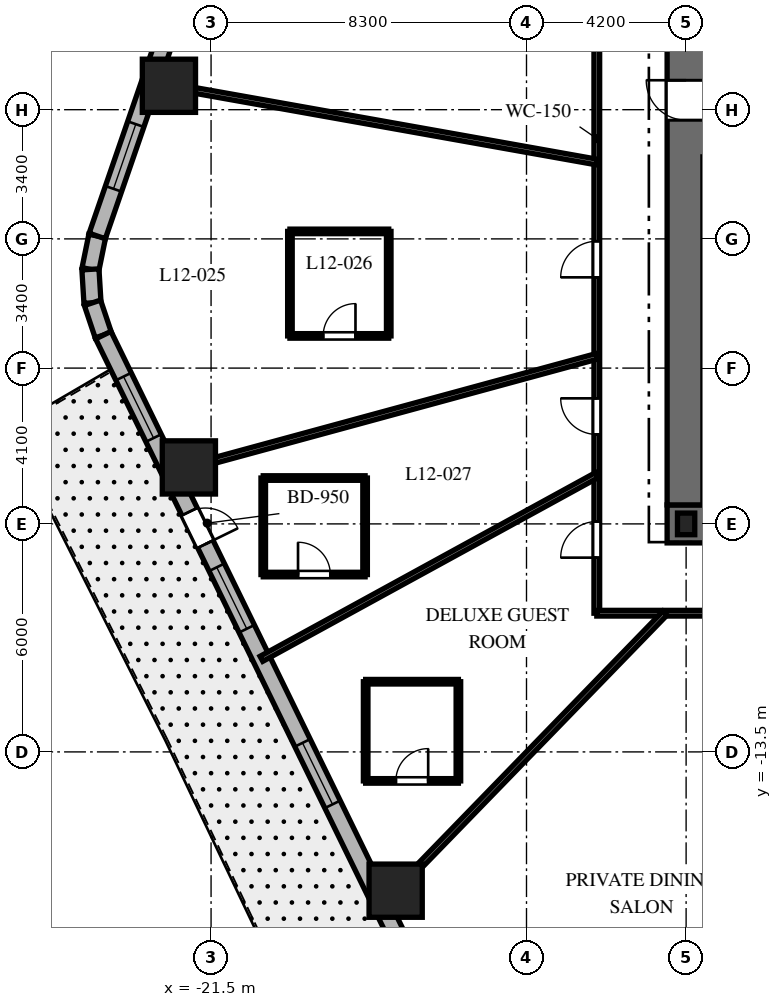
"""IFC4 building model, lengths in metres.
Left out: names, types, materials, properties, quantities, classifications, styles, units other than length and angle.
Written with IfcOpenShell. Run it as: python <this file> out.ifc"""

import sys

from ifc_helpers import new_model, si_unit, direction, frame, frame_2d, origin, origin_2d, place, context, subcontext, project, spatial, rectangle, i_section, extrude, element, fill, save


model = new_model("IFC4")
c1 = context("Model", 3, precision=1e-05, world=origin(), true_north=direction((0.0, 1.0)))
c2 = subcontext(c1, "Body", "Model", "MODEL_VIEW")
j1 = project(units=[si_unit("LENGTHUNIT", "METRE"), si_unit("PLANEANGLEUNIT", "RADIAN")], contexts=[c1])
p1 = place(None, origin())
s1 = spatial("IfcSite", under=j1, at=p1, CompositionType="ELEMENT")
p2 = place(p1, origin())
s2 = spatial("IfcBuilding", under=s1, at=p2, CompositionType="ELEMENT")
p3 = place(p2, frame((0.0, 0.0, 56.4)))
s3 = spatial("IfcBuildingStorey", under=s2, at=p3, CompositionType="ELEMENT", Elevation=56.4)
p4 = place(p3, frame((-9.5, -7.5, 0.0), z_axis=(0.0, 0.0, 1.0), x_axis=(1.0, 0.0, 0.0)))
e1 = element("IfcWall", 1, at=p4, inside=s3, PredefinedType="SHEAR", context=c2, shape_type="SweptSolid", body=[
    extrude(rectangle(XDim=19.0, YDim=1.0, at=frame_2d((9.5, 0.0))), origin(), (0.0, 0.0, 1.0), 3.7),
])
p5 = place(p4, frame((9.55, 0.0, 0.0)))
e2 = element("IfcOpeningElement", 2, at=p5, cuts=e1, PredefinedType="OPENING", context=c2, shape_type="SweptSolid", body=[
    extrude(rectangle(XDim=1.0, YDim=2.15, at=frame_2d((0.5, 1.075))), frame((0.0, 0.51, 0.0), z_axis=(0.0, -1.0, 0.0), x_axis=(1.0, 0.0, 0.0)), (0.0, 0.0, 1.0), 1.02),
])
p6 = place(p3, frame((-9.0, -7.0, 0.0), z_axis=(0.0, 0.0, 1.0), x_axis=(0.0, 1.0, 0.0)))
e3 = element("IfcWall", 3, at=p6, inside=s3, PredefinedType="SHEAR", context=c2, shape_type="SweptSolid", body=[
    extrude(rectangle(XDim=14.0, YDim=1.0, at=frame_2d((7.0, 0.0))), origin(), (0.0, 0.0, 1.0), 3.7),
])
p7 = place(p6, frame((10.125, 0.0, 0.0)))
e4 = element("IfcOpeningElement", 4, at=p7, cuts=e3, PredefinedType="OPENING", context=c2, shape_type="SweptSolid", body=[
    extrude(rectangle(XDim=1.05, YDim=2.15, at=frame_2d((0.525, 1.075))), frame((0.0, 0.51, 0.0), z_axis=(0.0, -1.0, 0.0), x_axis=(1.0, 0.0, 0.0)), (0.0, 0.0, 1.0), 1.02),
])
p8 = place(p3, frame((-8.458, -6.985, 0.0), z_axis=(0.0, 0.0, 1.0), x_axis=(0.0, 1.0, 0.0)))
e5 = element("IfcWall", 5, at=p8, inside=s3, PredefinedType="SHEAR", context=c2, shape_type="SweptSolid", body=[
    extrude(rectangle(XDim=9.143, YDim=0.2, at=frame_2d((4.572, 0.0))), origin(), (0.0, 0.0, 1.0), 3.7),
])
p9 = place(p3, frame((-9.0, -7.5, 0.0), z_axis=(0.0, 0.0, 1.0), x_axis=(1.0, 0.0, 0.0)))
e6 = element("IfcColumn", 6, at=p9, inside=s3, PredefinedType="COLUMN", context=c2, shape_type="SweptSolid", body=[
    extrude(i_section(OverallWidth=0.454, OverallDepth=0.569, WebThickness=0.078, FlangeThickness=0.125, at=origin_2d()), origin(), (0.0, 0.0, 1.0), 3.7),
])
for number, where, z_axis, x_axis in (
    (7, (-22.609, 4.029, 0.0), (0.0, 0.0, 1.0), (1.0, 0.0, 0.0)),
    (8, (-22.084, -6.014, 0.0), (0.0, 0.0, 1.0), (1.0, 0.0, 0.0)),
    (9, (-16.643, -17.152, 0.0), (0.0, 0.0, 1.0), (1.0, 0.0, 0.0)),
):
    element("IfcColumn", number, at=place(p3, frame(where, z_axis=z_axis, x_axis=x_axis)), inside=s3, PredefinedType="COLUMN", context=c2, shape_type="SweptSolid", body=[
        extrude(rectangle(XDim=1.4, YDim=1.4, at=origin_2d()), origin(), (0.0, 0.0, 1.0), 3.7),
    ])
p10 = place(p3, frame((-24.496, 0.077, 0.0), z_axis=(0.0, 0.0, 1.0), x_axis=(-0.199570594521, -0.979883451132, 0.0)))
e10 = element("IfcWall", 10, at=p10, inside=s3, PredefinedType="SOLIDWALL", context=c2, shape_type="SweptSolid", body=[
    extrude(rectangle(XDim=0.897, YDim=0.45, at=frame_2d((0.448, 0.0))), origin(), (0.0, 0.0, 1.0), 3.4),
])
p11 = place(p3, frame((-24.675, -0.802, 0.0), z_axis=(0.0, 0.0, 1.0), x_axis=(0.061188874166, -0.998126205286, 0.0)))
e11 = element("IfcWall", 11, at=p11, inside=s3, PredefinedType="SOLIDWALL", context=c2, shape_type="SweptSolid", body=[
    extrude(rectangle(XDim=0.882, YDim=0.45, at=frame_2d((0.441, 0.0))), origin(), (0.0, 0.0, 1.0), 3.4),
])
p12 = place(p3, frame((-24.621, -1.682, 0.0), z_axis=(0.0, 0.0, 1.0), x_axis=(0.317697451681, -0.948192137278, 0.0)))
e12 = element("IfcWall", 12, at=p12, inside=s3, PredefinedType="SOLIDWALL", context=c2, shape_type="SweptSolid", body=[
    extrude(rectangle(XDim=0.897, YDim=0.45, at=frame_2d((0.448, 0.0))), origin(), (0.0, 0.0, 1.0), 3.4),
])
p13 = place(p3, frame((-17.39, 20.678, 0.0), z_axis=(0.0, 0.0, 1.0), x_axis=(-0.326068018294, -0.945346310854, 0.0)))
e13 = element("IfcWall", 13, at=p13, inside=s3, PredefinedType="SOLIDWALL", context=c2, shape_type="SweptSolid", body=[
    extrude(rectangle(XDim=21.793, YDim=0.45, at=frame_2d((10.896, 0.0))), origin(), (0.0, 0.0, 1.0), 3.4),
])
p14 = place(p13, frame((1.26, 0.0, 0.8)))
e14 = element("IfcOpeningElement", 14, at=p14, cuts=e13, PredefinedType="OPENING", context=c2, shape_type="SweptSolid", body=[
    extrude(rectangle(XDim=1.8, YDim=1.8, at=frame_2d((0.9, 0.9))), frame((0.0, 0.235, 0.0), z_axis=(0.0, -1.0, 0.0), x_axis=(1.0, 0.0, 0.0)), (0.0, 0.0, 1.0), 0.47),
])
p15 = place(p13, frame((9.943, 0.0, 0.8)))
e15 = element("IfcOpeningElement", 15, at=p15, cuts=e13, PredefinedType="OPENING", context=c2, shape_type="SweptSolid", body=[
    extrude(rectangle(XDim=1.8, YDim=1.8, at=frame_2d((0.9, 0.9))), frame((0.0, 0.235, 0.0), z_axis=(0.0, -1.0, 0.0), x_axis=(1.0, 0.0, 0.0)), (0.0, 0.0, 1.0), 0.47),
])
p16 = place(p13, frame((18.68, 0.0, 0.8)))
e16 = element("IfcOpeningElement", 16, at=p16, cuts=e13, PredefinedType="OPENING", context=c2, shape_type="SweptSolid", body=[
    extrude(rectangle(XDim=1.8, YDim=1.8, at=frame_2d((0.9, 0.9))), frame((0.0, 0.235, 0.0), z_axis=(0.0, -1.0, 0.0), x_axis=(1.0, 0.0, 0.0)), (0.0, 0.0, 1.0), 0.47),
])
p17 = place(p3, frame((-24.336, -2.532, 0.0), z_axis=(0.0, 0.0, 1.0), x_axis=(0.438931326393, -0.898520612291, 0.0)))
e17 = element("IfcWall", 17, at=p17, inside=s3, PredefinedType="SOLIDWALL", context=c2, shape_type="SweptSolid", body=[
    extrude(rectangle(XDim=20.623, YDim=0.45, at=frame_2d((10.312, 0.0))), origin(), (0.0, 0.0, 1.0), 3.4),
])
p18 = place(p17, frame((5.171, 0.0, 0.0)))
e18 = element("IfcOpeningElement", 18, at=p18, cuts=e17, PredefinedType="OPENING", context=c2, shape_type="SweptSolid", body=[
    extrude(rectangle(XDim=0.95, YDim=2.15, at=frame_2d((0.475, 1.075))), frame((0.0, 0.235, 0.0), z_axis=(0.0, -1.0, 0.0), x_axis=(1.0, 0.0, 0.0)), (0.0, 0.0, 1.0), 0.47),
])
p19 = place(p17, frame((1.214, 0.0, 0.8)))
e19 = element("IfcOpeningElement", 19, at=p19, cuts=e17, PredefinedType="OPENING", context=c2, shape_type="SweptSolid", body=[
    extrude(rectangle(XDim=1.8, YDim=1.8, at=frame_2d((0.9, 0.9))), frame((0.0, 0.235, 0.0), z_axis=(0.0, -1.0, 0.0), x_axis=(1.0, 0.0, 0.0)), (0.0, 0.0, 1.0), 0.47),
])
p20 = place(p17, frame((6.8, 0.0, 0.8)))
e20 = element("IfcOpeningElement", 20, at=p20, cuts=e17, PredefinedType="OPENING", context=c2, shape_type="SweptSolid", body=[
    extrude(rectangle(XDim=1.8, YDim=1.8, at=frame_2d((0.9, 0.9))), frame((0.0, 0.235, 0.0), z_axis=(0.0, -1.0, 0.0), x_axis=(1.0, 0.0, 0.0)), (0.0, 0.0, 1.0), 0.47),
])
p21 = place(p17, frame((11.942, 0.0, 0.8)))
e21 = element("IfcOpeningElement", 21, at=p21, cuts=e17, PredefinedType="OPENING", context=c2, shape_type="SweptSolid", body=[
    extrude(rectangle(XDim=1.8, YDim=1.8, at=frame_2d((0.9, 0.9))), frame((0.0, 0.235, 0.0), z_axis=(0.0, -1.0, 0.0), x_axis=(1.0, 0.0, 0.0)), (0.0, 0.0, 1.0), 0.47),
])
p22 = place(p17, frame((17.66, 0.0, 0.8)))
e22 = element("IfcOpeningElement", 22, at=p22, cuts=e17, PredefinedType="OPENING", context=c2, shape_type="SweptSolid", body=[
    extrude(rectangle(XDim=1.8, YDim=1.8, at=frame_2d((0.9, 0.9))), frame((0.0, 0.235, 0.0), z_axis=(0.0, -1.0, 0.0), x_axis=(1.0, 0.0, 0.0)), (0.0, 0.0, 1.0), 0.47),
])
p23 = place(p3, frame((-11.35, -9.85, 0.0), z_axis=(0.0, 0.0, 1.0), x_axis=(0.0, 1.0, 0.0)))
e23 = element("IfcWall", 23, at=p23, inside=s3, PredefinedType="PARTITIONING", context=c2, shape_type="SweptSolid", body=[
    extrude(rectangle(XDim=19.7, YDim=0.15, at=frame_2d((9.85, 0.0))), origin(), (0.0, 0.0, 1.0), 2.84),
])
p24 = place(p23, frame((15.191, 0.0, 0.0)))
e24 = element("IfcOpeningElement", 24, at=p24, cuts=e23, PredefinedType="OPENING", context=c2, shape_type="SweptSolid", body=[
    extrude(rectangle(XDim=0.95, YDim=2.03, at=frame_2d((0.475, 1.015))), frame((0.0, 0.085, 0.0), z_axis=(0.0, -1.0, 0.0), x_axis=(1.0, 0.0, 0.0)), (0.0, 0.0, 1.0), 0.17),
])
p25 = place(p23, frame((8.838, 0.0, 0.0)))
e25 = element("IfcOpeningElement", 25, at=p25, cuts=e23, PredefinedType="OPENING", context=c2, shape_type="SweptSolid", body=[
    extrude(rectangle(XDim=0.95, YDim=2.03, at=frame_2d((0.475, 1.015))), frame((0.0, 0.085, 0.0), z_axis=(0.0, -1.0, 0.0), x_axis=(1.0, 0.0, 0.0)), (0.0, 0.0, 1.0), 0.17),
])
p26 = place(p23, frame((4.704, 0.0, 0.0)))
e26 = element("IfcOpeningElement", 26, at=p26, cuts=e23, PredefinedType="OPENING", context=c2, shape_type="SweptSolid", body=[
    extrude(rectangle(XDim=0.95, YDim=2.03, at=frame_2d((0.475, 1.015))), frame((0.0, 0.085, 0.0), z_axis=(0.0, -1.0, 0.0), x_axis=(1.0, 0.0, 0.0)), (0.0, 0.0, 1.0), 0.17),
])
p27 = place(p23, frame((1.462, 0.0, 0.0)))
e27 = element("IfcOpeningElement", 27, at=p27, cuts=e23, PredefinedType="OPENING", context=c2, shape_type="SweptSolid", body=[
    extrude(rectangle(XDim=0.95, YDim=2.03, at=frame_2d((0.475, 1.015))), frame((0.0, 0.085, 0.0), z_axis=(0.0, -1.0, 0.0), x_axis=(1.0, 0.0, 0.0)), (0.0, 0.0, 1.0), 0.17),
])
p28 = place(p3, frame((11.35, -9.85, 0.0), z_axis=(0.0, 0.0, 1.0), x_axis=(-1.0, 0.0, 0.0)))
e28 = element("IfcWall", 28, at=p28, inside=s3, PredefinedType="PARTITIONING", context=c2, shape_type="SweptSolid", body=[
    extrude(rectangle(XDim=22.7, YDim=0.15, at=frame_2d((11.35, 0.0))), origin(), (0.0, 0.0, 1.0), 2.84),
])
p29 = place(p28, frame((17.225, 0.0, 0.0)))
e29 = element("IfcOpeningElement", 29, at=p29, cuts=e28, PredefinedType="OPENING", context=c2, shape_type="SweptSolid", body=[
    extrude(rectangle(XDim=0.95, YDim=2.03, at=frame_2d((0.475, 1.015))), frame((0.0, 0.085, 0.0), z_axis=(0.0, -1.0, 0.0), x_axis=(1.0, 0.0, 0.0)), (0.0, 0.0, 1.0), 0.17),
])
p30 = place(p28, frame((10.444, 0.0, 0.0)))
e30 = element("IfcOpeningElement", 30, at=p30, cuts=e28, PredefinedType="OPENING", context=c2, shape_type="SweptSolid", body=[
    extrude(rectangle(XDim=0.95, YDim=2.03, at=frame_2d((0.475, 1.015))), frame((0.0, 0.085, 0.0), z_axis=(0.0, -1.0, 0.0), x_axis=(1.0, 0.0, 0.0)), (0.0, 0.0, 1.0), 0.17),
])
p31 = place(p28, frame((3.369, 0.0, 0.0)))
e31 = element("IfcOpeningElement", 31, at=p31, cuts=e28, PredefinedType="OPENING", context=c2, shape_type="SweptSolid", body=[
    extrude(rectangle(XDim=0.95, YDim=2.03, at=frame_2d((0.475, 1.015))), frame((0.0, 0.085, 0.0), z_axis=(0.0, -1.0, 0.0), x_axis=(1.0, 0.0, 0.0)), (0.0, 0.0, 1.0), 0.17),
])
p32 = place(p3, frame((-11.35, 2.023, 0.0), z_axis=(0.0, 0.0, 1.0), x_axis=(-0.984493741877, 0.17541970301, 0.0)))
e32 = element("IfcWall", 32, at=p32, inside=s3, PredefinedType="PARTITIONING", context=c2, shape_type="SweptSolid", body=[
    extrude(rectangle(XDim=11.937, YDim=0.15, at=frame_2d((5.969, 0.0))), origin(), (0.0, 0.0, 1.0), 2.54),
])
p33 = place(p3, frame((-11.35, -3.091, 0.0), z_axis=(0.0, 0.0, 1.0), x_axis=(-0.964859685283, -0.262765651704, 0.0)))
e33 = element("IfcWall", 33, at=p33, inside=s3, PredefinedType="PARTITIONING", context=c2, shape_type="SweptSolid", body=[
    extrude(rectangle(XDim=11.629, YDim=0.15, at=frame_2d((5.814, 0.0))), origin(), (0.0, 0.0, 1.0), 2.54),
])
p34 = place(p3, frame((-11.35, -6.217, 0.0), z_axis=(0.0, 0.0, 1.0), x_axis=(-0.877047587135, -0.480403507378, 0.0)))
e34 = element("IfcWall", 34, at=p34, inside=s3, PredefinedType="PARTITIONING", context=c2, shape_type="SweptSolid", body=[
    extrude(rectangle(XDim=10.062, YDim=0.15, at=frame_2d((5.031, 0.0))), origin(), (0.0, 0.0, 1.0), 2.54),
])
p35 = place(p3, frame((-9.558, -9.85, 0.0), z_axis=(0.0, 0.0, 1.0), x_axis=(-0.69638346089, -0.717669893056, 0.0)))
e35 = element("IfcWall", 35, at=p35, inside=s3, PredefinedType="PARTITIONING", context=c2, shape_type="SweptSolid", body=[
    extrude(rectangle(XDim=10.701, YDim=0.15, at=frame_2d((5.351, 0.0))), origin(), (0.0, 0.0, 1.0), 2.54),
])
p36 = place(p3, frame((-19.425, -2.553, 0.0), z_axis=(0.0, 0.0, 1.0), x_axis=(1.0, 0.0, 0.0)))
e36 = element("IfcWall", 36, at=p36, inside=s3, PredefinedType="PARTITIONING", context=c2, shape_type="SweptSolid", body=[
    extrude(rectangle(XDim=2.6, YDim=0.12, at=frame_2d((1.3, 0.0))), origin(), (0.0, 0.0, 1.0), 2.841),
])
p37 = place(p36, frame((0.875, 0.0, 0.0)))
e37 = element("IfcOpeningElement", 37, at=p37, cuts=e36, PredefinedType="OPENING", context=c2, shape_type="SweptSolid", body=[
    extrude(rectangle(XDim=0.85, YDim=2.03, at=frame_2d((0.425, 1.015))), frame((0.0, 0.07, 0.0), z_axis=(0.0, -1.0, 0.0), x_axis=(1.0, 0.0, 0.0)), (0.0, 0.0, 1.0), 0.14),
])
p38 = place(p3, frame((-16.825, -2.553, 0.0), z_axis=(0.0, 0.0, 1.0), x_axis=(0.0, 1.0, 0.0)))
e38 = element("IfcWall", 38, at=p38, inside=s3, PredefinedType="PARTITIONING", context=c2, shape_type="SweptSolid", body=[
    extrude(rectangle(XDim=2.75, YDim=0.12, at=frame_2d((1.375, 0.0))), origin(), (0.0, 0.0, 1.0), 3.4),
])
p39 = place(p3, frame((-16.825, 0.197, 0.0), z_axis=(0.0, 0.0, 1.0), x_axis=(-1.0, 0.0, 0.0)))
e39 = element("IfcWall", 39, at=p39, inside=s3, PredefinedType="PARTITIONING", context=c2, shape_type="SweptSolid", body=[
    extrude(rectangle(XDim=2.6, YDim=0.12, at=frame_2d((1.3, 0.0))), origin(), (0.0, 0.0, 1.0), 2.841),
])
p40 = place(p3, frame((-19.425, 0.197, 0.0), z_axis=(0.0, 0.0, 1.0), x_axis=(0.0, -1.0, 0.0)))
e40 = element("IfcWall", 40, at=p40, inside=s3, PredefinedType="PARTITIONING", context=c2, shape_type="SweptSolid", body=[
    extrude(rectangle(XDim=2.75, YDim=0.12, at=frame_2d((1.375, 0.0))), origin(), (0.0, 0.0, 1.0), 3.4),
])
p41 = place(p3, frame((-20.127, -8.833, 0.0), z_axis=(0.0, 0.0, 1.0), x_axis=(1.0, 0.0, 0.0)))
e41 = element("IfcWall", 41, at=p41, inside=s3, PredefinedType="PARTITIONING", context=c2, shape_type="SweptSolid", body=[
    extrude(rectangle(XDim=2.68, YDim=0.12, at=frame_2d((1.34, 0.0))), origin(), (0.0, 0.0, 1.0), 3.4),
])
p42 = place(p41, frame((0.915, 0.0, 0.0)))
e42 = element("IfcOpeningElement", 42, at=p42, cuts=e41, PredefinedType="OPENING", context=c2, shape_type="SweptSolid", body=[
    extrude(rectangle(XDim=0.85, YDim=2.03, at=frame_2d((0.425, 1.015))), frame((0.0, 0.07, 0.0), z_axis=(0.0, -1.0, 0.0), x_axis=(1.0, 0.0, 0.0)), (0.0, 0.0, 1.0), 0.14),
])
p43 = place(p3, frame((-17.447, -8.833, 0.0), z_axis=(0.0, 0.0, 1.0), x_axis=(0.0, 1.0, 0.0)))
e43 = element("IfcWall", 43, at=p43, inside=s3, PredefinedType="PARTITIONING", context=c2, shape_type="SweptSolid", body=[
    extrude(rectangle(XDim=2.54, YDim=0.12, at=frame_2d((1.27, 0.0))), origin(), (0.0, 0.0, 1.0), 2.84),
])
p44 = place(p3, frame((-17.447, -6.293, 0.0), z_axis=(0.0, 0.0, 1.0), x_axis=(-1.0, 0.0, 0.0)))
e44 = element("IfcWall", 44, at=p44, inside=s3, PredefinedType="PARTITIONING", context=c2, shape_type="SweptSolid", body=[
    extrude(rectangle(XDim=2.68, YDim=0.12, at=frame_2d((1.34, 0.0))), origin(), (0.0, 0.0, 1.0), 2.84),
])
p45 = place(p3, frame((-20.127, -6.293, 0.0), z_axis=(0.0, 0.0, 1.0), x_axis=(0.0, -1.0, 0.0)))
e45 = element("IfcWall", 45, at=p45, inside=s3, PredefinedType="PARTITIONING", context=c2, shape_type="SweptSolid", body=[
    extrude(rectangle(XDim=2.54, YDim=0.12, at=frame_2d((1.27, 0.0))), origin(), (0.0, 0.0, 1.0), 2.84),
])
p46 = place(p3, frame((-17.432, -14.263, 0.0), z_axis=(0.0, 0.0, 1.0), x_axis=(1.0, 0.0, 0.0)))
e46 = element("IfcWall", 46, at=p46, inside=s3, PredefinedType="PARTITIONING", context=c2, shape_type="SweptSolid", body=[
    extrude(rectangle(XDim=2.44, YDim=0.12, at=frame_2d((1.22, 0.0))), origin(), (0.0, 0.0, 1.0), 3.4),
])
p47 = place(p46, frame((0.795, 0.0, 0.0)))
e47 = element("IfcOpeningElement", 47, at=p47, cuts=e46, PredefinedType="OPENING", context=c2, shape_type="SweptSolid", body=[
    extrude(rectangle(XDim=0.85, YDim=2.03, at=frame_2d((0.425, 1.015))), frame((0.0, 0.07, 0.0), z_axis=(0.0, -1.0, 0.0), x_axis=(1.0, 0.0, 0.0)), (0.0, 0.0, 1.0), 0.14),
])
p48 = place(p3, frame((-14.992, -14.263, 0.0), z_axis=(0.0, 0.0, 1.0), x_axis=(0.0, 1.0, 0.0)))
e48 = element("IfcWall", 48, at=p48, inside=s3, PredefinedType="PARTITIONING", context=c2, shape_type="SweptSolid", body=[
    extrude(rectangle(XDim=2.61, YDim=0.12, at=frame_2d((1.305, 0.0))), origin(), (0.0, 0.0, 1.0), 2.927),
])
p49 = place(p3, frame((-14.992, -11.653, 0.0), z_axis=(0.0, 0.0, 1.0), x_axis=(-1.0, 0.0, 0.0)))
e49 = element("IfcWall", 49, at=p49, inside=s3, PredefinedType="PARTITIONING", context=c2, shape_type="SweptSolid", body=[
    extrude(rectangle(XDim=2.44, YDim=0.12, at=frame_2d((1.22, 0.0))), origin(), (0.0, 0.0, 1.0), 2.927),
])
p50 = place(p3, frame((-17.432, -11.653, 0.0), z_axis=(0.0, 0.0, 1.0), x_axis=(0.0, -1.0, 0.0)))
e50 = element("IfcWall", 50, at=p50, inside=s3, PredefinedType="PARTITIONING", context=c2, shape_type="SweptSolid", body=[
    extrude(rectangle(XDim=2.61, YDim=0.12, at=frame_2d((1.305, 0.0))), origin(), (0.0, 0.0, 1.0), 3.4),
])
p51 = place(p16, origin())
e51 = element("IfcWindow", 51, at=p51, inside=s3, PartitioningType="SINGLE_PANEL", PredefinedType="WINDOW", context=c2, shape_type="SweptSolid", body=[
    extrude(rectangle(XDim=1.8, YDim=1.8, at=frame_2d((0.9, 0.9))), frame((0.0, 0.03, 0.0), z_axis=(0.0, -1.0, 0.0), x_axis=(1.0, 0.0, 0.0)), (0.0, 0.0, 1.0), 0.06),
])
fill(e16, e51)
p52 = place(p18, origin())
e52 = element("IfcDoor", 52, at=p52, inside=s3, OperationType="SINGLE_SWING_RIGHT", PredefinedType="DOOR", context=c2, shape_type="SweptSolid", body=[
    extrude(rectangle(XDim=0.95, YDim=2.15, at=frame_2d((0.475, 1.075))), frame((0.0, 0.025, 0.0), z_axis=(0.0, -1.0, 0.0), x_axis=(1.0, 0.0, 0.0)), (0.0, 0.0, 1.0), 0.05),
])
fill(e18, e52)
p53 = place(p19, origin())
e53 = element("IfcWindow", 53, at=p53, inside=s3, PartitioningType="SINGLE_PANEL", PredefinedType="WINDOW", context=c2, shape_type="SweptSolid", body=[
    extrude(rectangle(XDim=1.8, YDim=1.8, at=frame_2d((0.9, 0.9))), frame((0.0, 0.03, 0.0), z_axis=(0.0, -1.0, 0.0), x_axis=(1.0, 0.0, 0.0)), (0.0, 0.0, 1.0), 0.06),
])
fill(e19, e53)
p54 = place(p20, origin())
e54 = element("IfcWindow", 54, at=p54, inside=s3, PartitioningType="SINGLE_PANEL", PredefinedType="WINDOW", context=c2, shape_type="SweptSolid", body=[
    extrude(rectangle(XDim=1.8, YDim=1.8, at=frame_2d((0.9, 0.9))), frame((0.0, 0.03, 0.0), z_axis=(0.0, -1.0, 0.0), x_axis=(1.0, 0.0, 0.0)), (0.0, 0.0, 1.0), 0.06),
])
fill(e20, e54)
p55 = place(p21, origin())
e55 = element("IfcWindow", 55, at=p55, inside=s3, PartitioningType="SINGLE_PANEL", PredefinedType="WINDOW", context=c2, shape_type="SweptSolid", body=[
    extrude(rectangle(XDim=1.8, YDim=1.8, at=frame_2d((0.9, 0.9))), frame((0.0, 0.03, 0.0), z_axis=(0.0, -1.0, 0.0), x_axis=(1.0, 0.0, 0.0)), (0.0, 0.0, 1.0), 0.06),
])
fill(e21, e55)
p56 = place(p7, origin())
e56 = element("IfcDoor", 56, at=p56, inside=s3, OperationType="SINGLE_SWING_RIGHT", PredefinedType="DOOR", context=c2, shape_type="SweptSolid", body=[
    extrude(rectangle(XDim=1.05, YDim=2.15, at=frame_2d((0.525, 1.075))), frame((0.0, 0.025, 0.0), z_axis=(0.0, -1.0, 0.0), x_axis=(1.0, 0.0, 0.0)), (0.0, 0.0, 1.0), 0.05),
])
fill(e4, e56)
p57 = place(p25, origin())
e57 = element("IfcDoor", 57, at=p57, inside=s3, OperationType="SINGLE_SWING_LEFT", PredefinedType="DOOR", context=c2, shape_type="SweptSolid", body=[
    extrude(rectangle(XDim=0.95, YDim=2.03, at=frame_2d((0.475, 1.015))), frame((0.0, 0.025, 0.0), z_axis=(0.0, -1.0, 0.0), x_axis=(1.0, 0.0, 0.0)), (0.0, 0.0, 1.0), 0.05),
])
fill(e25, e57)
p58 = place(p37, origin())
e58 = element("IfcDoor", 58, at=p58, inside=s3, OperationType="SINGLE_SWING_RIGHT", PredefinedType="DOOR", context=c2, shape_type="SweptSolid", body=[
    extrude(rectangle(XDim=0.85, YDim=2.03, at=frame_2d((0.425, 1.015))), frame((0.0, 0.025, 0.0), z_axis=(0.0, -1.0, 0.0), x_axis=(1.0, 0.0, 0.0)), (0.0, 0.0, 1.0), 0.05),
])
fill(e37, e58)
p59 = place(p26, origin())
e59 = element("IfcDoor", 59, at=p59, inside=s3, OperationType="SINGLE_SWING_RIGHT", PredefinedType="DOOR", context=c2, shape_type="SweptSolid", body=[
    extrude(rectangle(XDim=0.95, YDim=2.03, at=frame_2d((0.475, 1.015))), frame((0.0, 0.025, 0.0), z_axis=(0.0, -1.0, 0.0), x_axis=(1.0, 0.0, 0.0)), (0.0, 0.0, 1.0), 0.05),
])
fill(e26, e59)
p60 = place(p42, origin())
e60 = element("IfcDoor", 60, at=p60, inside=s3, OperationType="SINGLE_SWING_LEFT", PredefinedType="DOOR", context=c2, shape_type="SweptSolid", body=[
    extrude(rectangle(XDim=0.85, YDim=2.03, at=frame_2d((0.425, 1.015))), frame((0.0, 0.025, 0.0), z_axis=(0.0, -1.0, 0.0), x_axis=(1.0, 0.0, 0.0)), (0.0, 0.0, 1.0), 0.05),
])
fill(e42, e60)
p61 = place(p27, origin())
e61 = element("IfcDoor", 61, at=p61, inside=s3, OperationType="SINGLE_SWING_LEFT", PredefinedType="DOOR", context=c2, shape_type="SweptSolid", body=[
    extrude(rectangle(XDim=0.95, YDim=2.03, at=frame_2d((0.475, 1.015))), frame((0.0, 0.025, 0.0), z_axis=(0.0, -1.0, 0.0), x_axis=(1.0, 0.0, 0.0)), (0.0, 0.0, 1.0), 0.05),
])
fill(e27, e61)
p62 = place(p47, origin())
e62 = element("IfcDoor", 62, at=p62, inside=s3, OperationType="SINGLE_SWING_RIGHT", PredefinedType="DOOR", context=c2, shape_type="SweptSolid", body=[
    extrude(rectangle(XDim=0.85, YDim=2.03, at=frame_2d((0.425, 1.015))), frame((0.0, 0.025, 0.0), z_axis=(0.0, -1.0, 0.0), x_axis=(1.0, 0.0, 0.0)), (0.0, 0.0, 1.0), 0.05),
])
fill(e47, e62)
save(model, sys.argv[1])
